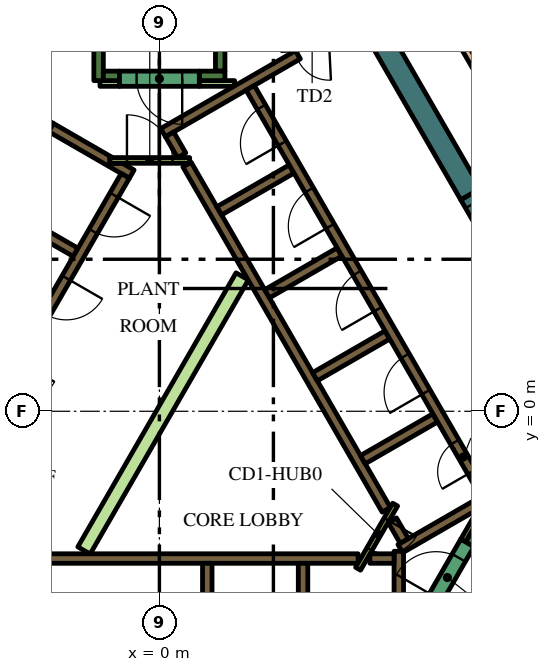
"""IFC4 building model, lengths in metres.
Left out: names, types, materials, properties, quantities, classifications, styles, units other than length and angle.
Written with IfcOpenShell. Run it as: python <this file> out.ifc"""

import sys

from ifc_helpers import new_model, si_unit, direction, frame, frame_2d, origin, origin_2d, place, context, subcontext, project, spatial, polyline, rectangle, outline, extrude, element, fill, save


model = new_model("IFC4")
c1 = context("Model", 3, precision=1e-05, world=origin(), true_north=direction((0.0, 1.0)))
c2 = subcontext(c1, "Body", "Model", "MODEL_VIEW")
j1 = project(units=[si_unit("LENGTHUNIT", "METRE"), si_unit("PLANEANGLEUNIT", "RADIAN")], contexts=[c1])
p1 = place(None, origin())
s1 = spatial("IfcSite", under=j1, at=p1, CompositionType="ELEMENT")
p2 = place(p1, origin())
s2 = spatial("IfcBuilding", under=s1, at=p2, CompositionType="ELEMENT")
p3 = place(p2, frame((0.0, 0.0, 344.4)))
s3 = spatial("IfcBuildingStorey", under=s2, at=p3, CompositionType="ELEMENT", Elevation=344.4)
p4 = place(p3, frame((5.928, 9.633, 0.0), z_axis=(0.0, 0.0, 1.0), x_axis=(0.499983823482, -0.8660347431, 0.0)))
e1 = element("IfcWall", 1, at=p4, inside=s3, PredefinedType="SOLIDWALL", context=c2, shape_type="SweptSolid", body=[
    extrude(rectangle(XDim=4.528, YDim=0.6, at=frame_2d((2.264, 0.0))), origin(), (0.0, 0.0, 1.0), 4.2),
])
p5 = place(p3, frame((8.168, -3.503, 0.0), z_axis=(0.0, 0.0, 1.0), x_axis=(0.49972245349, 0.866185586049, 0.0)))
e2 = element("IfcWall", 2, at=p5, inside=s3, PredefinedType="SOLIDWALL", context=c2, shape_type="SweptSolid", body=[
    extrude(rectangle(XDim=0.425, YDim=0.25, at=frame_2d((0.212, 0.0))), origin(), (0.0, 0.0, 1.0), 4.2),
])
p6 = place(p3, frame((1.6, 8.95, 0.0), z_axis=(0.0, 0.0, 1.0), x_axis=(0.0, 1.0, 0.0)))
e3 = element("IfcWall", 3, at=p6, inside=s3, PredefinedType="SOLIDWALL", context=c2, shape_type="SweptSolid", body=[
    extrude(rectangle(XDim=6.8, YDim=0.25, at=frame_2d((3.4, 0.0))), origin(), (0.0, 0.0, 1.0), 4.2),
])
p7 = place(p3, frame((1.05, 8.825, 0.0), z_axis=(0.0, 0.0, 1.0), x_axis=(1.0, 0.0, 0.0)))
e4 = element("IfcWall", 4, at=p7, inside=s3, PredefinedType="SOLIDWALL", context=c2, shape_type="SweptSolid", body=[
    extrude(rectangle(XDim=0.675, YDim=0.25, at=frame_2d((0.337, 0.0))), origin(), (0.0, 0.0, 1.0), 4.2),
])
p8 = place(p3, frame((-1.6, 8.7, 0.0), z_axis=(0.0, 0.0, 1.0), x_axis=(0.0, 1.0, 0.0)))
e5 = element("IfcWall", 5, at=p8, inside=s3, PredefinedType="SOLIDWALL", context=c2, shape_type="SweptSolid", body=[
    extrude(rectangle(XDim=7.05, YDim=0.25, at=frame_2d((3.525, 0.0))), origin(), (0.0, 0.0, 1.0), 4.2),
])
p9 = place(p3, frame((-1.475, 8.825, 0.0), z_axis=(0.0, 0.0, 1.0), x_axis=(1.0, 0.0, 0.0)))
e6 = element("IfcWall", 6, at=p9, inside=s3, PredefinedType="SOLIDWALL", context=c2, shape_type="SweptSolid", body=[
    extrude(rectangle(XDim=0.425, YDim=0.25, at=frame_2d((0.212, 0.0))), origin(), (0.0, 0.0, 1.0), 4.2),
])
p10 = place(p3, frame((6.3, -7.24, 0.0), z_axis=(0.0, 0.0, 1.0), x_axis=(0.0, 1.0, 0.0)))
e7 = element("IfcWall", 7, at=p10, inside=s3, PredefinedType="SOLIDWALL", context=c2, shape_type="SweptSolid", body=[
    extrude(rectangle(XDim=3.556, YDim=0.25, at=frame_2d((1.778, 0.0))), origin(), (0.0, 0.0, 1.0), 4.2),
])
p11 = place(p3, frame((5.538, -3.875, 0.0), z_axis=(0.0, 0.0, 1.0), x_axis=(1.0, 0.0, 0.0)))
e8 = element("IfcWall", 8, at=p11, inside=s3, PredefinedType="SOLIDWALL", context=c2, shape_type="SweptSolid", body=[
    extrude(rectangle(XDim=0.637, YDim=0.25, at=frame_2d((0.318, 0.0))), origin(), (0.0, 0.0, 1.0), 4.2),
])
p12 = place(p3, frame((-5.259, -3.875, 0.0), z_axis=(0.0, 0.0, 1.0), x_axis=(1.0, 0.0, 0.0)))
e9 = element("IfcWall", 9, at=p12, inside=s3, PredefinedType="SOLIDWALL", context=c2, shape_type="SweptSolid", body=[
    extrude(rectangle(XDim=10.489, YDim=0.25, at=frame_2d((5.244, 0.0))), origin(), (0.0, 0.0, 1.0), 4.2),
])
for number, where, z_axis, x_axis in (
    (10, (1.26, -4.0, 0.0), (0.0, 0.0, 1.0), (0.0, -1.0, 0.0)),
    (11, (3.78, -4.0, 0.0), (0.0, 0.0, 1.0), (0.0, -1.0, 0.0)),
):
    element("IfcWall", number, at=place(p3, frame(where, z_axis=z_axis, x_axis=x_axis)), inside=s3, PredefinedType="SOLIDWALL", context=c2, shape_type="SweptSolid", body=[
        extrude(rectangle(XDim=2.2, YDim=0.25, at=frame_2d((1.1, 0.0))), origin(), (0.0, 0.0, 1.0), 4.2),
    ])
p13 = place(p3, frame((9.19, -1.969, 0.0), z_axis=(0.0, 0.0, 1.0), x_axis=(-0.866057109641, -0.499945079824, 0.0)))
e12 = element("IfcWall", 12, at=p13, inside=s3, PredefinedType="SOLIDWALL", context=c2, shape_type="SweptSolid", body=[
    extrude(rectangle(XDim=3.291, YDim=0.25, at=frame_2d((1.646, 0.0))), origin(), (0.0, 0.0, 1.0), 4.2),
])
p14 = place(p3, frame((6.13, -2.867, 0.0), z_axis=(0.0, 0.0, 1.0), x_axis=(0.500160776593, -0.865932559475, 0.0)))
e13 = element("IfcWall", 13, at=p14, inside=s3, PredefinedType="SOLIDWALL", context=c2, shape_type="SweptSolid", body=[
    extrude(rectangle(XDim=0.627, YDim=0.25, at=frame_2d((0.313, 0.0))), origin(), (0.0, 0.0, 1.0), 4.2),
])
p15 = place(p3, frame((3.647, 9.38, 0.0), z_axis=(0.0, 0.0, 1.0), x_axis=(-0.866027868628, -0.499995730742, 0.0)))
e14 = element("IfcWall", 14, at=p15, inside=s3, PredefinedType="SOLIDWALL", context=c2, shape_type="SweptSolid", body=[
    extrude(rectangle(XDim=4.099, YDim=0.25, at=frame_2d((2.049, 0.0))), origin(), (0.0, 0.0, 1.0), 4.2),
])
p16 = place(p3, frame((0.268, 7.285, 0.0), z_axis=(0.0, 0.0, 1.0), x_axis=(0.500098681536, -0.865968422476, 0.0)))
e15 = element("IfcWall", 15, at=p16, inside=s3, PredefinedType="SOLIDWALL", context=c2, shape_type="SweptSolid", body=[
    extrude(rectangle(XDim=0.636, YDim=0.25, at=frame_2d((0.318, 0.0))), origin(), (0.0, 0.0, 1.0), 4.2),
])
p17 = place(p3, frame((5.97, -2.591, 0.0), z_axis=(0.0, 0.0, 1.0), x_axis=(-0.499994469932, 0.866028596547, 0.0)))
e16 = element("IfcWall", 16, at=p17, inside=s3, PredefinedType="SOLIDWALL", context=c2, shape_type="SweptSolid", body=[
    extrude(rectangle(XDim=10.488, YDim=0.25, at=frame_2d((5.244, 0.0))), origin(), (0.0, 0.0, 1.0), 4.2),
])
p18 = place(p3, frame((1.574, 5.274, 0.0), z_axis=(0.0, 0.0, 1.0), x_axis=(0.866028486751, 0.499994660107, 0.0)))
e17 = element("IfcWall", 17, at=p18, inside=s3, PredefinedType="SOLIDWALL", context=c2, shape_type="SweptSolid", body=[
    extrude(rectangle(XDim=2.2, YDim=0.25, at=frame_2d((1.1, 0.0))), origin(), (0.0, 0.0, 1.0), 4.2),
])
for number, where, z_axis, x_axis in (
    (18, (2.834, 3.091, 0.0), (0.0, 0.0, 1.0), (0.866, 0.5, 0.0)),
    (19, (4.094, 0.909, 0.0), (0.0, 0.0, 1.0), (0.866, 0.5, 0.0)),
    (20, (5.354, -1.274, 0.0), (0.0, 0.0, 1.0), (0.866, 0.5, 0.0)),
):
    element("IfcWall", number, at=place(p3, frame(where, z_axis=z_axis, x_axis=x_axis)), inside=s3, PredefinedType="SOLIDWALL", context=c2, shape_type="SweptSolid", body=[
        extrude(rectangle(XDim=2.2, YDim=0.25, at=frame_2d((1.1, 0.0))), origin(), (0.0, 0.0, 1.0), 4.2),
    ])
p19 = place(p3, frame((-8.06, -1.311, 0.0), z_axis=(0.0, 0.0, 1.0), x_axis=(0.50000273126, 0.866023826885, 0.0)))
e21 = element("IfcWall", 21, at=p19, inside=s3, PredefinedType="SOLIDWALL", context=c2, shape_type="SweptSolid", body=[
    extrude(rectangle(XDim=10.33, YDim=0.25, at=frame_2d((5.165, 0.0))), origin(), (0.0, 0.0, 1.0), 4.2),
])
p20 = place(p3, origin())
e22 = element("IfcWall", 22, at=p20, inside=s3, PredefinedType="SOLIDWALL", context=c2, shape_type="SweptSolid", body=[
    extrude(outline(polyline([(-2.912, 7.356), (-2.787, 7.573), (-1.232, 6.675), (-1.303, 6.675), (-1.304, 6.675), (-1.304, 6.675), (-1.304, 6.525), (-1.304, 6.525), (-1.303, 6.525), (-0.971, 6.525), (-0.665, 6.348), (-0.79, 6.132), (-1.007, 6.257), (-1.007, 6.257), (-2.912, 7.356)])), origin(), (0.0, 0.0, 1.0), 4.2),
])
p21 = place(p3, frame((-2.204, 4.182, 0.0), z_axis=(0.0, 0.0, 1.0), x_axis=(-0.866008176907, 0.50002983664, 0.0)))
e23 = element("IfcWall", 23, at=p21, inside=s3, PredefinedType="SOLIDWALL", context=c2, shape_type="SweptSolid", body=[
    extrude(rectangle(XDim=2.2, YDim=0.25, at=frame_2d((1.1, 0.0))), origin(), (0.0, 0.0, 1.0), 4.2),
])
p22 = place(p3, frame((1.05, 8.625, 0.0), z_axis=(0.0, 0.0, 1.0), x_axis=(1.0, 0.0, 0.0)))
e24 = element("IfcWall", 24, at=p22, inside=s3, PredefinedType="PARTITIONING", context=c2, shape_type="SweptSolid", body=[
    extrude(rectangle(XDim=0.929, YDim=0.15, at=frame_2d((0.464, 0.0))), origin(), (0.0, 0.0, 1.0), 3.3),
])
p23 = place(p3, frame((-1.564, 8.625, 0.0), z_axis=(0.0, 0.0, 1.0), x_axis=(1.0, 0.0, 0.0)))
e25 = element("IfcWall", 25, at=p23, inside=s3, PredefinedType="PARTITIONING", context=c2, shape_type="SweptSolid", body=[
    extrude(rectangle(XDim=0.514, YDim=0.15, at=frame_2d((0.257, 0.0))), origin(), (0.0, 0.0, 1.0), 3.3),
])
p24 = place(p3, frame((8.459, -2.599, 0.0), z_axis=(0.0, 0.0, 1.0), x_axis=(-0.500041054325, -0.866001699761, 0.0)))
e26 = element("IfcWall", 26, at=p24, inside=s3, PredefinedType="PARTITIONING", context=c2, shape_type="SweptSolid", body=[
    extrude(rectangle(XDim=0.929, YDim=0.15, at=frame_2d((0.464, 0.0))), origin(), (0.0, 0.0, 1.0), 4.2),
])
e27 = element("IfcWall", 27, at=p20, inside=s3, PredefinedType="PARTITIONING", context=c2, shape_type="SweptSolid", body=[
    extrude(outline(polyline([(2.017, 3.643), (2.342, 3.456), (-1.822, -3.756), (-2.147, -3.568), (2.017, 3.643)])), origin(), (0.0, 0.0, 1.0), 3.3),
])
p25 = place(p3, frame((8.565, -2.185, 0.0), z_axis=(0.0, 0.0, 1.0), x_axis=(-0.499997954832, 0.866026584559, 0.0)))
e28 = element("IfcWall", 28, at=p25, inside=s3, PredefinedType="SOLIDWALL", context=c2, shape_type="SweptSolid", body=[
    extrude(rectangle(XDim=12.35, YDim=0.25, at=frame_2d((6.175, 0.0))), origin(), (0.0, 0.0, 1.0), 4.2),
])
p26 = place(p25, frame((0.685, 0.0, 0.0)))
e29 = element("IfcOpeningElement", 29, at=p26, cuts=e28, PredefinedType="OPENING", context=c2, shape_type="SweptSolid", body=[
    extrude(rectangle(XDim=0.9, YDim=2.1, at=frame_2d((0.45, 1.05))), frame((0.0, 0.135, 0.0), z_axis=(0.0, -1.0, 0.0), x_axis=(1.0, 0.0, 0.0)), (0.0, 0.0, 1.0), 0.27),
])
p27 = place(p25, frame((3.105, 0.0, 0.0)))
e30 = element("IfcOpeningElement", 30, at=p27, cuts=e28, PredefinedType="OPENING", context=c2, shape_type="SweptSolid", body=[
    extrude(rectangle(XDim=1.1, YDim=2.1, at=frame_2d((0.55, 1.05))), frame((0.0, 0.135, 0.0), z_axis=(0.0, -1.0, 0.0), x_axis=(1.0, 0.0, 0.0)), (0.0, 0.0, 1.0), 0.27),
])
p28 = place(p25, frame((5.625, 0.0, 0.0)))
e31 = element("IfcOpeningElement", 31, at=p28, cuts=e28, PredefinedType="OPENING", context=c2, shape_type="SweptSolid", body=[
    extrude(rectangle(XDim=1.1, YDim=2.1, at=frame_2d((0.55, 1.05))), frame((0.0, 0.135, 0.0), z_axis=(0.0, -1.0, 0.0), x_axis=(1.0, 0.0, 0.0)), (0.0, 0.0, 1.0), 0.27),
])
p29 = place(p25, frame((8.145, 0.0, 0.0)))
e32 = element("IfcOpeningElement", 32, at=p29, cuts=e28, PredefinedType="OPENING", context=c2, shape_type="SweptSolid", body=[
    extrude(rectangle(XDim=1.1, YDim=2.1, at=frame_2d((0.55, 1.05))), frame((0.0, 0.135, 0.0), z_axis=(0.0, -1.0, 0.0), x_axis=(1.0, 0.0, 0.0)), (0.0, 0.0, 1.0), 0.27),
])
p30 = place(p25, frame((10.665, 0.0, 0.0)))
e33 = element("IfcOpeningElement", 33, at=p30, cuts=e28, PredefinedType="OPENING", context=c2, shape_type="SweptSolid", body=[
    extrude(rectangle(XDim=1.1, YDim=2.1, at=frame_2d((0.55, 1.05))), frame((0.0, 0.135, 0.0), z_axis=(0.0, -1.0, 0.0), x_axis=(1.0, 0.0, 0.0)), (0.0, 0.0, 1.0), 0.27),
])
p31 = place(p3, frame((-0.898, 6.194, 0.0), z_axis=(0.0, 0.0, 1.0), x_axis=(-0.499996202215, -0.866027596426, 0.0)))
e34 = element("IfcWall", 34, at=p31, inside=s3, PredefinedType="SOLIDWALL", context=c2, shape_type="SweptSolid", body=[
    extrude(rectangle(XDim=9.83, YDim=0.25, at=frame_2d((4.915, 0.0))), origin(), (0.0, 0.0, 1.0), 4.2),
])
p32 = place(p31, frame((0.585, 0.0, 0.0)))
e35 = element("IfcOpeningElement", 35, at=p32, cuts=e34, PredefinedType="OPENING", context=c2, shape_type="SweptSolid", body=[
    extrude(rectangle(XDim=1.1, YDim=2.1, at=frame_2d((0.55, 1.05))), frame((0.0, 0.135, 0.0), z_axis=(0.0, -1.0, 0.0), x_axis=(1.0, 0.0, 0.0)), (0.0, 0.0, 1.0), 0.27),
])
p33 = place(p31, frame((3.105, 0.0, 0.0)))
e36 = element("IfcOpeningElement", 36, at=p33, cuts=e34, PredefinedType="OPENING", context=c2, shape_type="SweptSolid", body=[
    extrude(rectangle(XDim=1.1, YDim=2.1, at=frame_2d((0.55, 1.05))), frame((0.0, 0.135, 0.0), z_axis=(0.0, -1.0, 0.0), x_axis=(1.0, 0.0, 0.0)), (0.0, 0.0, 1.0), 0.27),
])
p34 = place(p31, frame((5.625, 0.0, 0.0)))
e37 = element("IfcOpeningElement", 37, at=p34, cuts=e34, PredefinedType="OPENING", context=c2, shape_type="SweptSolid", body=[
    extrude(rectangle(XDim=1.1, YDim=2.1, at=frame_2d((0.55, 1.05))), frame((0.0, 0.135, 0.0), z_axis=(0.0, -1.0, 0.0), x_axis=(1.0, 0.0, 0.0)), (0.0, 0.0, 1.0), 0.27),
])
p35 = place(p31, frame((8.145, 0.0, 0.0)))
e38 = element("IfcOpeningElement", 38, at=p35, cuts=e34, PredefinedType="OPENING", context=c2, shape_type="SweptSolid", body=[
    extrude(rectangle(XDim=1.1, YDim=2.1, at=frame_2d((0.55, 1.05))), frame((0.0, 0.135, 0.0), z_axis=(0.0, -1.0, 0.0), x_axis=(1.0, 0.0, 0.0)), (0.0, 0.0, 1.0), 0.27),
])
p36 = place(p3, frame((7.053, -5.284, 0.0), z_axis=(0.0, 0.0, 1.0), x_axis=(0.500078061341, 0.865980330357, 0.0)))
e39 = element("IfcWall", 39, at=p36, inside=s3, PredefinedType="SOLIDWALL", context=c2, shape_type="SweptSolid", body=[
    extrude(rectangle(XDim=2.1, YDim=0.4, at=frame_2d((1.05, 0.0))), origin(), (0.0, 0.0, 1.0), 4.2),
])
p37 = place(p36, frame((0.45, 0.0, 0.0)))
e40 = element("IfcOpeningElement", 40, at=p37, cuts=e39, PredefinedType="OPENING", context=c2, shape_type="SweptSolid", body=[
    extrude(rectangle(XDim=1.2, YDim=2.1, at=frame_2d((0.6, 1.05))), frame((0.0, 0.21, 0.0), z_axis=(0.0, -1.0, 0.0), x_axis=(1.0, 0.0, 0.0)), (0.0, 0.0, 1.0), 0.42),
])
p38 = place(p3, frame((1.05, 8.75, 0.0), z_axis=(0.0, 0.0, 1.0), x_axis=(-1.0, 0.0, 0.0)))
e41 = element("IfcWall", 41, at=p38, inside=s3, PredefinedType="SOLIDWALL", context=c2, shape_type="SweptSolid", body=[
    extrude(rectangle(XDim=2.1, YDim=0.4, at=frame_2d((1.05, 0.0))), origin(), (0.0, 0.0, 1.0), 4.2),
])
p39 = place(p38, frame((0.45, 0.0, 0.0)))
e42 = element("IfcOpeningElement", 42, at=p39, cuts=e41, PredefinedType="OPENING", context=c2, shape_type="SweptSolid", body=[
    extrude(rectangle(XDim=1.2, YDim=2.1, at=frame_2d((0.6, 1.05))), frame((0.0, 0.21, 0.0), z_axis=(0.0, -1.0, 0.0), x_axis=(1.0, 0.0, 0.0)), (0.0, 0.0, 1.0), 0.42),
])
p40 = place(p3, frame((6.203, -2.456, 0.0), z_axis=(0.0, 0.0, 1.0), x_axis=(-0.500043961785, -0.866000020948, 0.0)))
e43 = element("IfcWall", 43, at=p40, inside=s3, PredefinedType="PARTITIONING", context=c2, shape_type="SweptSolid", body=[
    extrude(rectangle(XDim=1.95, YDim=0.15, at=frame_2d((0.975, 0.0))), origin(), (0.0, 0.0, 1.0), 4.2),
])
p41 = place(p40, frame((0.45, 0.0, 0.0)))
e44 = element("IfcOpeningElement", 44, at=p41, cuts=e43, PredefinedType="OPENING", context=c2, shape_type="SweptSolid", body=[
    extrude(rectangle(XDim=0.9, YDim=2.1, at=frame_2d((0.45, 1.05))), frame((0.0, 0.085, 0.0), z_axis=(0.0, -1.0, 0.0), x_axis=(1.0, 0.0, 0.0)), (0.0, 0.0, 1.0), 0.17),
])
p42 = place(p3, frame((-1.303, 6.6, 0.0), z_axis=(0.0, 0.0, 1.0), x_axis=(1.0, 0.0, 0.0)))
e45 = element("IfcWall", 45, at=p42, inside=s3, PredefinedType="PARTITIONING", context=c2, shape_type="SweptSolid", body=[
    extrude(rectangle(XDim=2.1, YDim=0.15, at=frame_2d((1.05, 0.0))), origin(), (0.0, 0.0, 1.0), 4.2),
])
p43 = place(p42, frame((0.45, 0.0, 0.0)))
e46 = element("IfcOpeningElement", 46, at=p43, cuts=e45, PredefinedType="OPENING", context=c2, shape_type="SweptSolid", body=[
    extrude(rectangle(XDim=1.2, YDim=2.1, at=frame_2d((0.6, 1.05))), frame((0.0, 0.085, 0.0), z_axis=(0.0, -1.0, 0.0), x_axis=(1.0, 0.0, 0.0)), (0.0, 0.0, 1.0), 0.17),
])
p44 = place(p3, frame((8.192, 5.711, 0.0), z_axis=(0.0, 0.0, 1.0), x_axis=(0.500062241894, -0.865989465428, 0.0)))
e47 = element("IfcWall", 47, at=p44, inside=s3, PredefinedType="SOLIDWALL", context=c2, shape_type="SweptSolid", body=[
    extrude(rectangle(XDim=1.7, YDim=0.6, at=frame_2d((0.85, 0.0))), origin(), (0.0, 0.0, 1.0), 4.2),
])
p45 = place(p44, frame((0.25, 0.0, 0.0)))
e48 = element("IfcOpeningElement", 48, at=p45, cuts=e47, PredefinedType="OPENING", context=c2, shape_type="SweptSolid", body=[
    extrude(rectangle(XDim=1.2, YDim=2.1, at=frame_2d((0.6, 1.05))), frame((0.0, 0.31, 0.0), z_axis=(0.0, -1.0, 0.0), x_axis=(1.0, 0.0, 0.0)), (0.0, 0.0, 1.0), 0.62),
])
p46 = place(p3, frame((17.234, -6.35, 0.0), z_axis=(0.0, 0.0, 1.0), x_axis=(-0.499998496574, 0.866026271786, 0.0)))
e49 = element("IfcWall", 49, at=p46, inside=s3, PredefinedType="PARTITIONING", context=c2, shape_type="SweptSolid", body=[
    extrude(rectangle(XDim=20.9, YDim=0.2, at=frame_2d((10.45, 0.0))), origin(), (0.0, 0.0, 1.0), 3.3),
])
p47 = place(p46, frame((9.65, 0.0, 0.0)))
e50 = element("IfcOpeningElement", 50, at=p47, cuts=e49, PredefinedType="OPENING", context=c2, shape_type="SweptSolid", body=[
    extrude(rectangle(XDim=1.6, YDim=2.1, at=frame_2d((0.8, 1.05))), frame((0.0, 0.11, 0.0), z_axis=(0.0, -1.0, 0.0), x_axis=(1.0, 0.0, 0.0)), (0.0, 0.0, 1.0), 0.22),
])
p48 = place(p3, frame((18.181, -1.79, 0.0), z_axis=(0.0, 0.0, 1.0), x_axis=(-0.500002158106, 0.866024157798, 0.0)))
e51 = element("IfcWall", 51, at=p48, inside=s3, PredefinedType="SOLIDWALL", context=c2, shape_type="SweptSolid", body=[
    extrude(rectangle(XDim=21.282, YDim=0.3, at=frame_2d((10.641, 0.0))), origin(), (0.0, 0.0, 1.0), 3.3),
])
p49 = place(p26, origin())
e52 = element("IfcDoor", 52, at=p49, inside=s3, OperationType="SINGLE_SWING_LEFT", PredefinedType="DOOR", context=c2, shape_type="SweptSolid", body=[
    extrude(rectangle(XDim=0.9, YDim=2.1, at=frame_2d((0.45, 1.05))), frame((0.0, 0.025, 0.0), z_axis=(0.0, -1.0, 0.0), x_axis=(1.0, 0.0, 0.0)), (0.0, 0.0, 1.0), 0.05),
])
fill(e29, e52)
p50 = place(p27, origin())
e53 = element("IfcDoor", 53, at=p50, inside=s3, OperationType="DOUBLE_DOOR_SLIDING", PredefinedType="DOOR", context=c2, shape_type="SweptSolid", body=[
    extrude(rectangle(XDim=1.1, YDim=2.1, at=frame_2d((0.55, 1.05))), frame((0.0, 0.025, 0.0), z_axis=(0.0, -1.0, 0.0), x_axis=(1.0, 0.0, 0.0)), (0.0, 0.0, 1.0), 0.05),
])
fill(e30, e53)
p51 = place(p28, origin())
e54 = element("IfcDoor", 54, at=p51, inside=s3, OperationType="DOUBLE_DOOR_SLIDING", PredefinedType="DOOR", context=c2, shape_type="SweptSolid", body=[
    extrude(rectangle(XDim=1.1, YDim=2.1, at=frame_2d((0.55, 1.05))), frame((0.0, 0.025, 0.0), z_axis=(0.0, -1.0, 0.0), x_axis=(1.0, 0.0, 0.0)), (0.0, 0.0, 1.0), 0.05),
])
fill(e31, e54)
p52 = place(p29, origin())
e55 = element("IfcDoor", 55, at=p52, inside=s3, OperationType="DOUBLE_DOOR_SLIDING", PredefinedType="DOOR", context=c2, shape_type="SweptSolid", body=[
    extrude(rectangle(XDim=1.1, YDim=2.1, at=frame_2d((0.55, 1.05))), frame((0.0, 0.025, 0.0), z_axis=(0.0, -1.0, 0.0), x_axis=(1.0, 0.0, 0.0)), (0.0, 0.0, 1.0), 0.05),
])
fill(e32, e55)
p53 = place(p30, origin())
e56 = element("IfcDoor", 56, at=p53, inside=s3, OperationType="DOUBLE_DOOR_SLIDING", PredefinedType="DOOR", context=c2, shape_type="SweptSolid", body=[
    extrude(rectangle(XDim=1.1, YDim=2.1, at=frame_2d((0.55, 1.05))), frame((0.0, 0.025, 0.0), z_axis=(0.0, -1.0, 0.0), x_axis=(1.0, 0.0, 0.0)), (0.0, 0.0, 1.0), 0.05),
])
fill(e33, e56)
p54 = place(p32, origin())
e57 = element("IfcDoor", 57, at=p54, inside=s3, OperationType="DOUBLE_DOOR_SLIDING", PredefinedType="DOOR", context=c2, shape_type="SweptSolid", body=[
    extrude(rectangle(XDim=1.1, YDim=2.1, at=frame_2d((0.55, 1.05))), frame((0.0, 0.025, 0.0), z_axis=(0.0, -1.0, 0.0), x_axis=(1.0, 0.0, 0.0)), (0.0, 0.0, 1.0), 0.05),
])
fill(e35, e57)
p55 = place(p33, origin())
e58 = element("IfcDoor", 58, at=p55, inside=s3, OperationType="DOUBLE_DOOR_SLIDING", PredefinedType="DOOR", context=c2, shape_type="SweptSolid", body=[
    extrude(rectangle(XDim=1.1, YDim=2.1, at=frame_2d((0.55, 1.05))), frame((0.0, 0.025, 0.0), z_axis=(0.0, -1.0, 0.0), x_axis=(1.0, 0.0, 0.0)), (0.0, 0.0, 1.0), 0.05),
])
fill(e36, e58)
p56 = place(p37, origin())
e59 = element("IfcDoor", 59, at=p56, inside=s3, OperationType="SINGLE_SWING_LEFT", PredefinedType="DOOR", context=c2, shape_type="SweptSolid", body=[
    extrude(rectangle(XDim=1.2, YDim=2.1, at=frame_2d((0.6, 1.05))), frame((0.0, 0.025, 0.0), z_axis=(0.0, -1.0, 0.0), x_axis=(1.0, 0.0, 0.0)), (0.0, 0.0, 1.0), 0.05),
])
fill(e40, e59)
p57 = place(p39, origin())
e60 = element("IfcDoor", 60, at=p57, inside=s3, OperationType="SINGLE_SWING_LEFT", PredefinedType="DOOR", context=c2, shape_type="SweptSolid", body=[
    extrude(rectangle(XDim=1.2, YDim=2.1, at=frame_2d((0.6, 1.05))), frame((0.0, 0.025, 0.0), z_axis=(0.0, -1.0, 0.0), x_axis=(1.0, 0.0, 0.0)), (0.0, 0.0, 1.0), 0.05),
])
fill(e42, e60)
p58 = place(p41, origin())
e61 = element("IfcDoor", 61, at=p58, inside=s3, OperationType="SINGLE_SWING_LEFT", PredefinedType="DOOR", context=c2, shape_type="SweptSolid", body=[
    extrude(rectangle(XDim=0.9, YDim=2.1, at=frame_2d((0.45, 1.05))), frame((0.0, 0.025, 0.0), z_axis=(0.0, -1.0, 0.0), x_axis=(1.0, 0.0, 0.0)), (0.0, 0.0, 1.0), 0.05),
])
fill(e44, e61)
p59 = place(p43, origin())
e62 = element("IfcDoor", 62, at=p59, inside=s3, OperationType="SINGLE_SWING_LEFT", PredefinedType="DOOR", context=c2, shape_type="SweptSolid", body=[
    extrude(rectangle(XDim=1.2, YDim=2.1, at=frame_2d((0.6, 1.05))), frame((0.0, 0.025, 0.0), z_axis=(0.0, -1.0, 0.0), x_axis=(1.0, 0.0, 0.0)), (0.0, 0.0, 1.0), 0.05),
])
fill(e46, e62)
p60 = place(p2, frame((0.0, 0.0, 348.6)))
p61 = place(p60, origin())
p62 = place(p61, frame((10.695, -6.175, 0.0)))
p63 = place(p62, frame((0.0, 0.0, 1.15)))
e63 = element("IfcWindow", 63, at=p63, inside=s3, PartitioningType="SINGLE_PANEL", PredefinedType="WINDOW", context=c2, shape_type="SweptSolid", body=[
    extrude(rectangle(XDim=7.364, YDim=5.955, at=origin_2d()), origin(), (0.0, 0.0, 1.0), 0.05),
])
p64 = place(p61, frame((0.0, 12.35, 0.0)))
p65 = place(p64, frame((0.0, 0.0, 1.15)))
e64 = element("IfcWindow", 64, at=p65, inside=s3, PartitioningType="SINGLE_PANEL", PredefinedType="WINDOW", context=c2, shape_type="SweptSolid", body=[
    extrude(rectangle(XDim=2.95, YDim=6.8, at=origin_2d()), origin(), (0.0, 0.0, 1.0), 0.05),
])
save(model, sys.argv[1])
